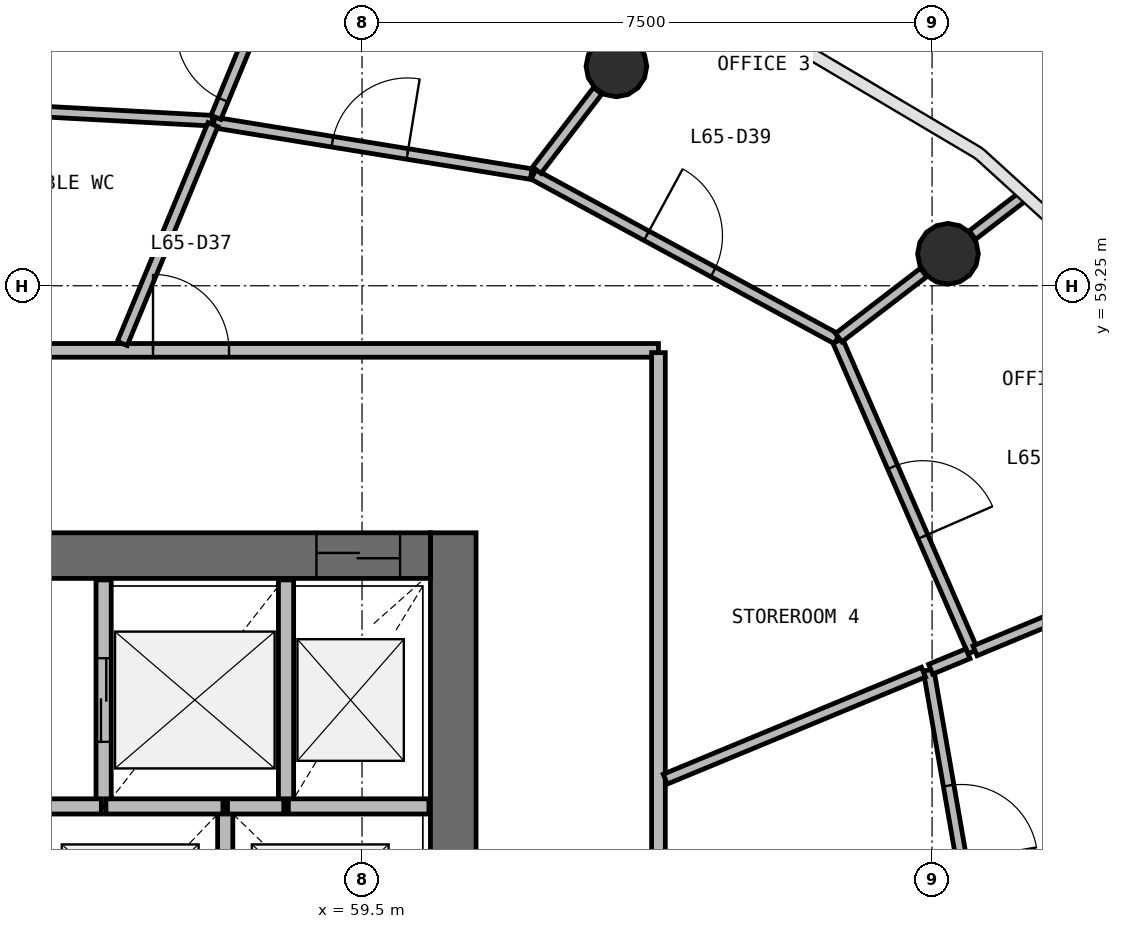
"""IFC4 building model, lengths in metres.
Left out: names, types, materials, properties, quantities, classifications, styles, units other than length and angle.
Written with IfcOpenShell. Run it as: python <this file> out.ifc"""

import sys

from ifc_helpers import new_model, si_unit, direction, frame, frame_2d, origin, origin_2d, place, context, subcontext, project, spatial, rectangle, circle, extrude, source, transform, mapped, element, fill, save


model = new_model("IFC4")
c1 = context("Model", 3, precision=1e-05, world=origin(), true_north=direction((0.0, 1.0)))
c2 = subcontext(c1, "Body", "Model", "MODEL_VIEW")
j1 = project(units=[si_unit("LENGTHUNIT", "METRE"), si_unit("PLANEANGLEUNIT", "RADIAN")], contexts=[c1])
p1 = place(None, origin())
s1 = spatial("IfcSite", under=j1, at=p1, CompositionType="ELEMENT")
p2 = place(p1, origin())
s2 = spatial("IfcBuilding", under=s1, at=p2, CompositionType="ELEMENT")
p3 = place(p2, frame((0.0, 0.0, 265.7)))
s3 = spatial("IfcBuildingStorey", under=s2, at=p3, CompositionType="ELEMENT", Elevation=265.7)
p4 = place(p3, frame((60.7, 40.0, 0.0), z_axis=(0.0, 0.0, 1.0), x_axis=(0.0, 1.0, 0.0)))
e1 = element("IfcWall", 1, at=p4, inside=s3, PredefinedType="SHEAR", context=c2, shape_type="SweptSolid", body=[
    extrude(rectangle(XDim=16.0, YDim=0.6, at=frame_2d((8.0, 0.0))), origin(), (0.0, 0.0, 1.0), 3.9),
])
p5 = place(p4, frame((7.1, 0.0, 0.0)))
e2 = element("IfcOpeningElement", 2, at=p5, cuts=e1, PredefinedType="OPENING", context=c2, shape_type="SweptSolid", body=[
    extrude(rectangle(XDim=1.8, YDim=2.1, at=frame_2d((0.9, 1.05))), frame((0.0, 0.31, 0.0), z_axis=(0.0, -1.0, 0.0), x_axis=(1.0, 0.0, 0.0)), (0.0, 0.0, 1.0), 0.62),
])
p6 = place(p3, frame((60.4, 55.7, 0.0), z_axis=(0.0, 0.0, 1.0), x_axis=(-1.0, 0.0, 0.0)))
e3 = element("IfcWall", 3, at=p6, inside=s3, PredefinedType="SHEAR", context=c2, shape_type="SweptSolid", body=[
    extrude(rectangle(XDim=16.8, YDim=0.6, at=frame_2d((8.4, 0.0))), origin(), (0.0, 0.0, 1.0), 3.9),
])
p7 = place(p6, frame((0.4, 0.0, 0.0)))
e4 = element("IfcOpeningElement", 4, at=p7, cuts=e3, PredefinedType="OPENING", context=c2, shape_type="SweptSolid", body=[
    extrude(rectangle(XDim=1.1, YDim=2.1, at=frame_2d((0.55, 1.05))), frame((0.0, 0.31, 0.0), z_axis=(0.0, -1.0, 0.0), x_axis=(1.0, 0.0, 0.0)), (0.0, 0.0, 1.0), 0.62),
])
p8 = place(p6, frame((10.3, 0.0, 0.0)))
e5 = element("IfcOpeningElement", 5, at=p8, cuts=e3, PredefinedType="OPENING", context=c2, shape_type="SweptSolid", body=[
    extrude(rectangle(XDim=1.2, YDim=2.1, at=frame_2d((0.6, 1.05))), frame((0.0, 0.31, 0.0), z_axis=(0.0, -1.0, 0.0), x_axis=(1.0, 0.0, 0.0)), (0.0, 0.0, 1.0), 0.62),
])
p9 = place(p6, frame((7.25, 0.0, 0.0)))
e6 = element("IfcOpeningElement", 6, at=p9, cuts=e3, PredefinedType="OPENING", context=c2, shape_type="SweptSolid", body=[
    extrude(rectangle(XDim=1.1, YDim=2.1, at=frame_2d((0.55, 1.05))), frame((0.0, 0.31, 0.0), z_axis=(0.0, -1.0, 0.0), x_axis=(1.0, 0.0, 0.0)), (0.0, 0.0, 1.0), 0.62),
])
m1 = source(origin(), c2, "Body", "SweptSolid", [
    extrude(circle(Radius=0.4, at=origin_2d()), origin(), (0.0, 0.0, 1.0), 3.9),
])
for number, where, z_axis, x_axis in (
    (7, (67.209, 59.671, 0.0), (0.0, 0.0, 1.0), (1.0, 0.0, 0.0)),
    (8, (62.847, 62.136, 0.0), (0.0, 0.0, 1.0), (1.0, 0.0, 0.0)),
):
    element("IfcColumn", number, at=place(p3, frame(where, z_axis=z_axis, x_axis=x_axis)), inside=s3, PredefinedType="COLUMN", context=c2, shape_type="MappedRepresentation", body=[
        mapped(m1, transform((0.0, 0.0, 0.0), scale=1.0)),
    ])
p10 = place(p3, frame((56.1, 55.38, 0.0), z_axis=(0.0, 0.0, 1.0), x_axis=(0.0, -1.0, 0.0)))
e9 = element("IfcWall", 9, at=p10, inside=s3, PredefinedType="SOLIDWALL", context=c2, shape_type="SweptSolid", body=[
    extrude(rectangle(XDim=2.98, YDim=0.2, at=frame_2d((1.49, 0.0))), origin(), (0.0, 0.0, 1.0), 2.7),
])
p11 = place(p10, frame((1.03, 0.0, 0.0)))
e10 = element("IfcOpeningElement", 10, at=p11, cuts=e9, PredefinedType="OPENING", context=c2, shape_type="SweptSolid", body=[
    extrude(rectangle(XDim=1.1, YDim=2.1, at=frame_2d((0.55, 1.05))), frame((0.0, 0.11, 0.0), z_axis=(0.0, -1.0, 0.0), x_axis=(1.0, 0.0, 0.0)), (0.0, 0.0, 1.0), 0.22),
])
p12 = place(p3, frame((58.5, 52.4, 0.0), z_axis=(0.0, 0.0, 1.0), x_axis=(0.0, 1.0, 0.0)))
e11 = element("IfcWall", 11, at=p12, inside=s3, PredefinedType="SOLIDWALL", context=c2, shape_type="SweptSolid", body=[
    extrude(rectangle(XDim=2.98, YDim=0.2, at=frame_2d((1.49, 0.0))), origin(), (0.0, 0.0, 1.0), 2.7),
])
p13 = place(p3, frame((57.7, 50.01, 0.0), z_axis=(0.0, 0.0, 1.0), x_axis=(0.0, 1.0, 0.0)))
e12 = element("IfcWall", 12, at=p13, inside=s3, PredefinedType="SOLIDWALL", context=c2, shape_type="SweptSolid", body=[
    extrude(rectangle(XDim=2.39, YDim=0.2, at=frame_2d((1.195, 0.0))), origin(), (0.0, 0.0, 1.0), 3.62),
])
p14 = place(p3, frame((60.38, 52.4, 0.0), z_axis=(0.0, 0.0, 1.0), x_axis=(-1.0, 0.0, 0.0)))
e13 = element("IfcWall", 13, at=p14, inside=s3, PredefinedType="SOLIDWALL", context=c2, shape_type="SweptSolid", body=[
    extrude(rectangle(XDim=1.85, YDim=0.2, at=frame_2d((0.925, 0.0))), origin(), (0.0, 0.0, 1.0), 2.7),
])
p15 = place(p3, frame((57.67, 52.4, 0.0), z_axis=(0.0, 0.0, 1.0), x_axis=(-1.0, 0.0, 0.0)))
e14 = element("IfcWall", 14, at=p15, inside=s3, PredefinedType="SOLIDWALL", context=c2, shape_type="SweptSolid", body=[
    extrude(rectangle(XDim=1.54, YDim=0.2, at=frame_2d((0.77, 0.0))), origin(), (0.0, 0.0, 1.0), 3.62),
])
p16 = place(p3, frame((56.07, 52.4, 0.0), z_axis=(0.0, 0.0, 1.0), x_axis=(-1.0, 0.0, 0.0)))
e15 = element("IfcWall", 15, at=p16, inside=s3, PredefinedType="SOLIDWALL", context=c2, shape_type="SweptSolid", body=[
    extrude(rectangle(XDim=0.84, YDim=0.2, at=frame_2d((0.42, 0.0))), origin(), (0.0, 0.0, 1.0), 3.62),
])
p17 = place(p3, frame((58.47, 52.4, 0.0), z_axis=(0.0, 0.0, 1.0), x_axis=(-1.0, 0.0, 0.0)))
e16 = element("IfcWall", 16, at=p17, inside=s3, PredefinedType="SOLIDWALL", context=c2, shape_type="SweptSolid", body=[
    extrude(rectangle(XDim=0.74, YDim=0.2, at=frame_2d((0.37, 0.0))), origin(), (0.0, 0.0, 1.0), 2.7),
])
p18 = place(p3, frame((40.6, 58.4, 0.0), z_axis=(0.0, 0.0, 1.0), x_axis=(1.0, 0.0, 0.0)))
e17 = element("IfcWall", 17, at=p18, inside=s3, PredefinedType="PARTITIONING", context=c2, shape_type="SweptSolid", body=[
    extrude(rectangle(XDim=22.8, YDim=0.18, at=frame_2d((11.4, 0.0))), origin(), (0.0, 0.0, 1.0), 2.92),
])
p19 = place(p18, frame((13.05, 0.0, 0.0)))
e18 = element("IfcOpeningElement", 18, at=p19, cuts=e17, PredefinedType="OPENING", context=c2, shape_type="SweptSolid", body=[
    extrude(rectangle(XDim=0.9, YDim=2.1, at=frame_2d((0.45, 1.05))), frame((0.0, 0.1, 0.0), z_axis=(0.0, -1.0, 0.0), x_axis=(1.0, 0.0, 0.0)), (0.0, 0.0, 1.0), 0.2),
])
p20 = place(p18, frame((10.85, 0.0, 0.0)))
e19 = element("IfcOpeningElement", 19, at=p20, cuts=e17, PredefinedType="OPENING", context=c2, shape_type="SweptSolid", body=[
    extrude(rectangle(XDim=0.9, YDim=2.1, at=frame_2d((0.45, 1.05))), frame((0.0, 0.1, 0.0), z_axis=(0.0, -1.0, 0.0), x_axis=(1.0, 0.0, 0.0)), (0.0, 0.0, 1.0), 0.2),
])
p21 = place(p18, frame((8.75, 0.0, 0.0)))
e20 = element("IfcOpeningElement", 20, at=p21, cuts=e17, PredefinedType="OPENING", context=c2, shape_type="SweptSolid", body=[
    extrude(rectangle(XDim=1.0, YDim=2.1, at=frame_2d((0.5, 1.05))), frame((0.0, 0.1, 0.0), z_axis=(0.0, -1.0, 0.0), x_axis=(1.0, 0.0, 0.0)), (0.0, 0.0, 1.0), 0.2),
])
p22 = place(p18, frame((16.15, 0.0, 0.0)))
e21 = element("IfcOpeningElement", 21, at=p22, cuts=e17, PredefinedType="OPENING", context=c2, shape_type="SweptSolid", body=[
    extrude(rectangle(XDim=1.0, YDim=2.1, at=frame_2d((0.5, 1.05))), frame((0.0, 0.1, 0.0), z_axis=(0.0, -1.0, 0.0), x_axis=(1.0, 0.0, 0.0)), (0.0, 0.0, 1.0), 0.2),
])
p23 = place(p3, frame((63.4, 58.37, 0.0), z_axis=(0.0, 0.0, 1.0), x_axis=(0.0, -1.0, 0.0)))
e22 = element("IfcWall", 22, at=p23, inside=s3, PredefinedType="PARTITIONING", context=c2, shape_type="SweptSolid", body=[
    extrude(rectangle(XDim=20.74, YDim=0.18, at=frame_2d((10.37, 0.0))), origin(), (0.0, 0.0, 1.0), 2.92),
])
p24 = place(p23, frame((9.89, 0.0, 0.0)))
e23 = element("IfcOpeningElement", 23, at=p24, cuts=e22, PredefinedType="OPENING", context=c2, shape_type="SweptSolid", body=[
    extrude(rectangle(XDim=1.0, YDim=2.1, at=frame_2d((0.5, 1.05))), frame((0.0, 0.1, 0.0), z_axis=(0.0, -1.0, 0.0), x_axis=(1.0, 0.0, 0.0)), (0.0, 0.0, 1.0), 0.2),
])
p25 = place(p3, frame((61.756, 60.714, 0.0), z_axis=(0.0, 0.0, 1.0), x_axis=(0.879039493049, -0.47674895874, 0.0)))
e24 = element("IfcWall", 24, at=p25, inside=s3, PredefinedType="PARTITIONING", context=c2, shape_type="SweptSolid", body=[
    extrude(rectangle(XDim=4.541, YDim=0.14, at=frame_2d((2.271, 0.0))), origin(), (0.0, 0.0, 1.0), 2.92),
])
p26 = place(p25, frame((1.691, 0.0, 0.0)))
e25 = element("IfcOpeningElement", 25, at=p26, cuts=e24, PredefinedType="OPENING", context=c2, shape_type="SweptSolid", body=[
    extrude(rectangle(XDim=1.0, YDim=2.1, at=frame_2d((0.5, 1.05))), frame((0.0, 0.08, 0.0), z_axis=(0.0, -1.0, 0.0), x_axis=(1.0, 0.0, 0.0)), (0.0, 0.0, 1.0), 0.16),
])
p27 = place(p3, frame((65.76, 58.521, 0.0), z_axis=(0.0, 0.0, 1.0), x_axis=(0.398952504151, -0.916971591398, 0.0)))
e26 = element("IfcWall", 26, at=p27, inside=s3, PredefinedType="PARTITIONING", context=c2, shape_type="SweptSolid", body=[
    extrude(rectangle(XDim=4.456, YDim=0.14, at=frame_2d((2.228, 0.0))), origin(), (0.0, 0.0, 1.0), 2.92),
])
p28 = place(p27, frame((1.806, 0.0, 0.0)))
e27 = element("IfcOpeningElement", 27, at=p28, cuts=e26, PredefinedType="OPENING", context=c2, shape_type="SweptSolid", body=[
    extrude(rectangle(XDim=1.0, YDim=2.1, at=frame_2d((0.5, 1.05))), frame((0.0, 0.08, 0.0), z_axis=(0.0, -1.0, 0.0), x_axis=(1.0, 0.0, 0.0)), (0.0, 0.0, 1.0), 0.16),
])
p29 = place(p3, frame((57.55, 61.398, 0.0), z_axis=(0.0, 0.0, 1.0), x_axis=(0.987024287771, -0.160571028986, 0.0)))
e28 = element("IfcWall", 28, at=p29, inside=s3, PredefinedType="PARTITIONING", context=c2, shape_type="SweptSolid", body=[
    extrude(rectangle(XDim=4.231, YDim=0.14, at=frame_2d((2.116, 0.0))), origin(), (0.0, 0.0, 1.0), 2.92),
])
p30 = place(p29, frame((1.581, 0.0, 0.0)))
e29 = element("IfcOpeningElement", 29, at=p30, cuts=e28, PredefinedType="OPENING", context=c2, shape_type="SweptSolid", body=[
    extrude(rectangle(XDim=1.0, YDim=2.1, at=frame_2d((0.5, 1.05))), frame((0.0, 0.08, 0.0), z_axis=(0.0, -1.0, 0.0), x_axis=(1.0, 0.0, 0.0)), (0.0, 0.0, 1.0), 0.16),
])
p31 = place(p3, frame((66.954, 54.194, 0.0), z_axis=(0.0, 0.0, 1.0), x_axis=(0.171306772049, -0.985217737279, 0.0)))
e30 = element("IfcWall", 30, at=p31, inside=s3, PredefinedType="PARTITIONING", context=c2, shape_type="SweptSolid", body=[
    extrude(rectangle(XDim=4.193, YDim=0.14, at=frame_2d((2.096, 0.0))), origin(), (0.0, 0.0, 1.0), 2.92),
])
p32 = place(p31, frame((1.543, 0.0, 0.0)))
e31 = element("IfcOpeningElement", 31, at=p32, cuts=e30, PredefinedType="OPENING", context=c2, shape_type="SweptSolid", body=[
    extrude(rectangle(XDim=1.0, YDim=2.1, at=frame_2d((0.5, 1.05))), frame((0.0, 0.08, 0.0), z_axis=(0.0, -1.0, 0.0), x_axis=(1.0, 0.0, 0.0)), (0.0, 0.0, 1.0), 0.16),
])
p33 = place(p3, frame((63.49, 52.759, 0.0), z_axis=(0.0, 0.0, 1.0), x_axis=(0.923884131492, 0.382672329255, 0.0)))
e32 = element("IfcWall", 32, at=p33, inside=s3, PredefinedType="PARTITIONING", context=c2, shape_type="SweptSolid", body=[
    extrude(rectangle(XDim=3.677, YDim=0.14, at=frame_2d((1.839, 0.0))), origin(), (0.0, 0.0, 1.0), 2.92),
])
p34 = place(p3, frame((57.531, 61.421, 0.0), z_axis=(0.0, 0.0, 1.0), x_axis=(-0.998536661474, 0.05407897644, 0.0)))
e33 = element("IfcWall", 33, at=p34, inside=s3, PredefinedType="PARTITIONING", context=c2, shape_type="SweptSolid", body=[
    extrude(rectangle(XDim=3.742, YDim=0.14, at=frame_2d((1.871, 0.0))), origin(), (0.0, 0.0, 1.0), 2.92),
])
p35 = place(p3, frame((56.345, 58.49, 0.0), z_axis=(0.0, 0.0, 1.0), x_axis=(0.382635311625, 0.923899463306, 0.0)))
e34 = element("IfcWall", 34, at=p35, inside=s3, PredefinedType="PARTITIONING", context=c2, shape_type="SweptSolid", body=[
    extrude(rectangle(XDim=3.118, YDim=0.14, at=frame_2d((1.559, 0.0))), origin(), (0.0, 0.0, 1.0), 2.92),
])
p36 = place(p3, frame((67.565, 54.447, 0.0), z_axis=(0.0, 0.0, 1.0), x_axis=(0.923881369595, 0.382678997223, 0.0)))
e35 = element("IfcWall", 35, at=p36, inside=s3, PredefinedType="PARTITIONING", context=c2, shape_type="SweptSolid", body=[
    extrude(rectangle(XDim=3.009, YDim=0.14, at=frame_2d((1.505, 0.0))), origin(), (0.0, 0.0, 1.0), 2.92),
])
p37 = place(p3, frame((57.577, 61.465, 0.0), z_axis=(0.0, 0.0, 1.0), x_axis=(0.3827260732, 0.923861868946, 0.0)))
e36 = element("IfcWall", 36, at=p37, inside=s3, PredefinedType="PARTITIONING", context=c2, shape_type="SweptSolid", body=[
    extrude(rectangle(XDim=1.671, YDim=0.14, at=frame_2d((0.835, 0.0))), origin(), (0.0, 0.0, 1.0), 2.92),
])
p38 = place(p37, frame((0.25, 0.0, 0.0)))
e37 = element("IfcOpeningElement", 37, at=p38, cuts=e36, PredefinedType="OPENING", context=c2, shape_type="SweptSolid", body=[
    extrude(rectangle(XDim=1.0, YDim=2.1, at=frame_2d((0.5, 1.05))), frame((0.0, 0.08, 0.0), z_axis=(0.0, -1.0, 0.0), x_axis=(1.0, 0.0, 0.0)), (0.0, 0.0, 1.0), 0.16),
])
p39 = place(p3, frame((65.771, 58.567, 0.0), z_axis=(0.0, 0.0, 1.0), x_axis=(0.793313221417, 0.608813709376, 0.0)))
e38 = element("IfcWall", 38, at=p39, inside=s3, PredefinedType="PARTITIONING", context=c2, shape_type="SweptSolid", body=[
    extrude(rectangle(XDim=1.408, YDim=0.14, at=frame_2d((0.704, 0.0))), origin(), (0.0, 0.0, 1.0), 2.92),
])
p40 = place(p3, frame((61.799, 60.771, 0.0), z_axis=(0.0, 0.0, 1.0), x_axis=(0.608805214603, 0.793319740503, 0.0)))
e39 = element("IfcWall", 39, at=p40, inside=s3, PredefinedType="PARTITIONING", context=c2, shape_type="SweptSolid", body=[
    extrude(rectangle(XDim=1.317, YDim=0.14, at=frame_2d((0.658, 0.0))), origin(), (0.0, 0.0, 1.0), 2.92),
])
p41 = place(p3, frame((67.531, 59.917, 0.0), z_axis=(0.0, 0.0, 1.0), x_axis=(0.793396032013, 0.608705788034, 0.0)))
e40 = element("IfcWall", 40, at=p41, inside=s3, PredefinedType="PARTITIONING", context=c2, shape_type="SweptSolid", body=[
    extrude(rectangle(XDim=0.822, YDim=0.14, at=frame_2d((0.411, 0.0))), origin(), (0.0, 0.0, 1.0), 2.92),
])
p42 = place(p3, frame((66.981, 54.206, 0.0), z_axis=(0.0, 0.0, 1.0), x_axis=(0.923944086963, 0.382527546938, 0.0)))
e41 = element("IfcWall", 41, at=p42, inside=s3, PredefinedType="PARTITIONING", context=c2, shape_type="SweptSolid", body=[
    extrude(rectangle(XDim=0.532, YDim=0.14, at=frame_2d((0.266, 0.0))), origin(), (0.0, 0.0, 1.0), 2.92),
])
m2 = source(origin(), c2, "Body", "SweptSolid", [
    extrude(rectangle(XDim=1.1, YDim=2.1, at=frame_2d((0.55, 1.05))), frame((0.0, 0.025, 0.0), z_axis=(0.0, -1.0, 0.0), x_axis=(1.0, 0.0, 0.0)), (0.0, 0.0, 1.0), 0.05),
])
p43 = place(p11, origin())
e42 = element("IfcDoor", 42, at=p43, inside=s3, OperationType="DOUBLE_DOOR_SLIDING", PredefinedType="USERDEFINED", context=c2, shape_type="MappedRepresentation", body=[
    mapped(m2, transform((0.0, 0.0, 0.0), scale=1.0)),
])
fill(e10, e42)
p44 = place(p7, origin())
e43 = element("IfcDoor", 43, at=p44, inside=s3, OperationType="DOUBLE_DOOR_SLIDING", PredefinedType="USERDEFINED", context=c2, shape_type="MappedRepresentation", body=[
    mapped(m2, transform((0.0, 0.0, 0.0), scale=1.0)),
])
fill(e4, e43)
m3 = source(origin(), c2, "Body", "SweptSolid", [
    extrude(rectangle(XDim=1.0, YDim=2.1, at=frame_2d((0.5, 1.05))), frame((0.0, 0.025, 0.0), z_axis=(0.0, -1.0, 0.0), x_axis=(1.0, 0.0, 0.0)), (0.0, 0.0, 1.0), 0.05),
])
p45 = place(p38, origin())
e44 = element("IfcDoor", 44, at=p45, inside=s3, OperationType="SINGLE_SWING_RIGHT", PredefinedType="DOOR", context=c2, shape_type="MappedRepresentation", body=[
    mapped(m3, transform((0.0, 0.0, 0.0), scale=1.0)),
])
fill(e37, e44)
p46 = place(p32, origin())
e45 = element("IfcDoor", 45, at=p46, inside=s3, OperationType="SINGLE_SWING_RIGHT", PredefinedType="DOOR", context=c2, shape_type="MappedRepresentation", body=[
    mapped(m3, transform((0.0, 0.0, 0.0), scale=1.0)),
])
fill(e31, e45)
p47 = place(p22, origin())
e46 = element("IfcDoor", 46, at=p47, inside=s3, OperationType="SINGLE_SWING_LEFT", PredefinedType="DOOR", context=c2, shape_type="MappedRepresentation", body=[
    mapped(m3, transform((0.0, 0.0, 0.0), scale=1.0)),
])
fill(e21, e46)
p48 = place(p28, origin())
e47 = element("IfcDoor", 47, at=p48, inside=s3, OperationType="SINGLE_SWING_RIGHT", PredefinedType="DOOR", context=c2, shape_type="MappedRepresentation", body=[
    mapped(m3, transform((0.0, 0.0, 0.0), scale=1.0)),
])
fill(e27, e47)
p49 = place(p26, origin())
e48 = element("IfcDoor", 48, at=p49, inside=s3, OperationType="SINGLE_SWING_LEFT", PredefinedType="DOOR", context=c2, shape_type="MappedRepresentation", body=[
    mapped(m3, transform((0.0, 0.0, 0.0), scale=1.0)),
])
fill(e25, e48)
p50 = place(p30, origin())
e49 = element("IfcDoor", 49, at=p50, inside=s3, OperationType="SINGLE_SWING_RIGHT", PredefinedType="DOOR", context=c2, shape_type="MappedRepresentation", body=[
    mapped(m3, transform((0.0, 0.0, 0.0), scale=1.0)),
])
fill(e29, e49)
save(model, sys.argv[1])
